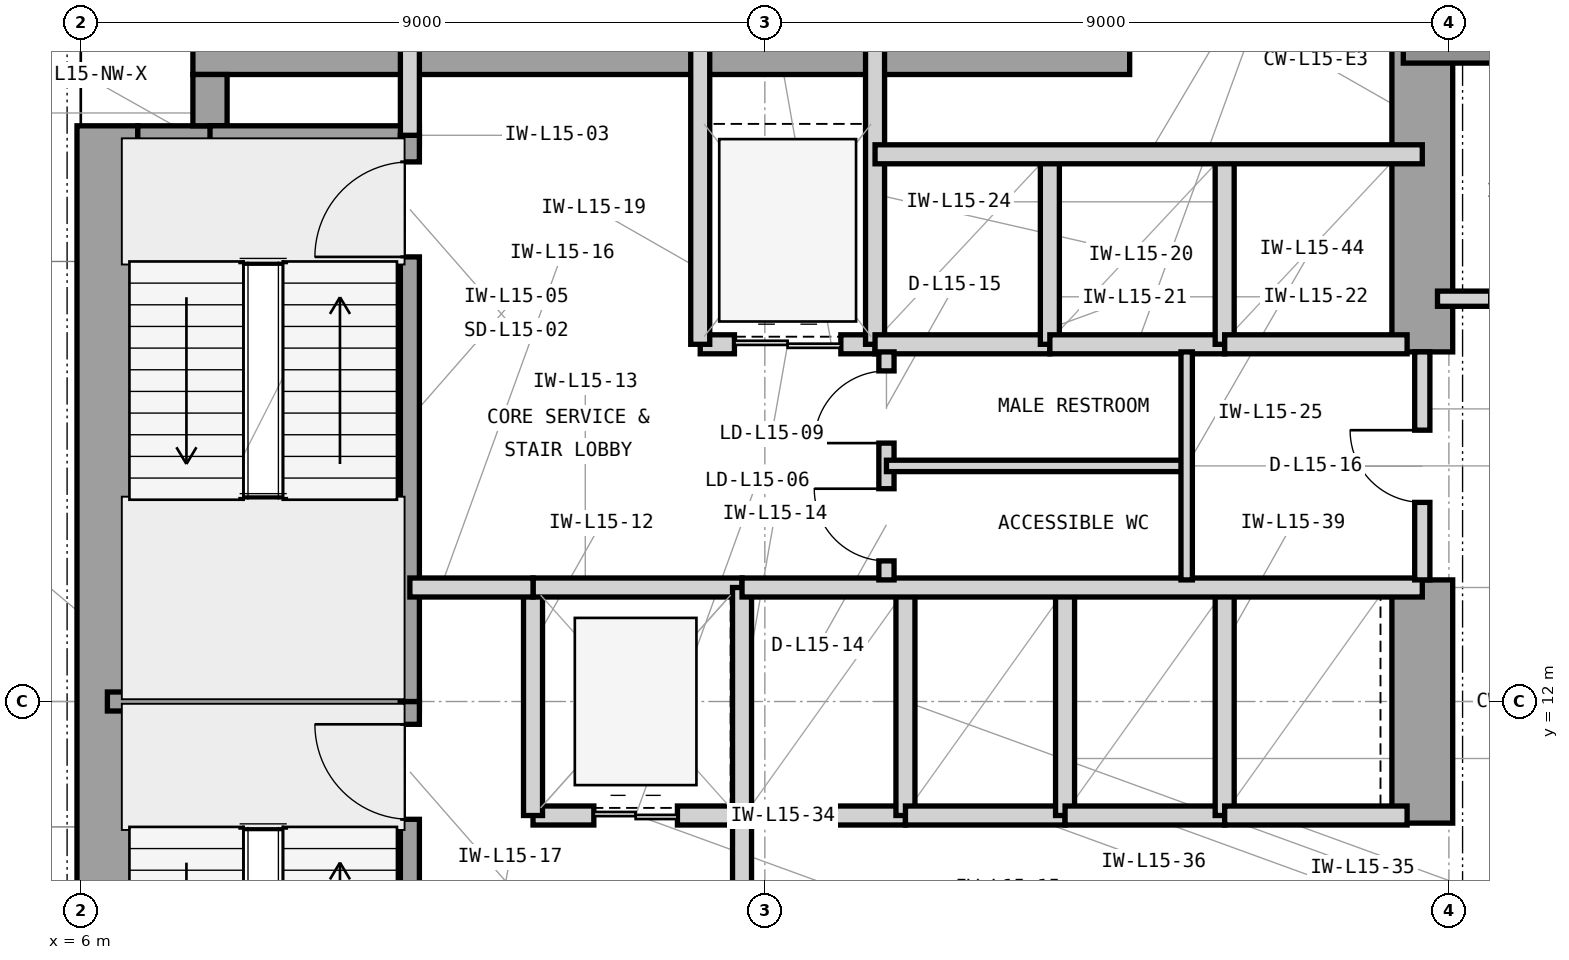
"""IFC4 building model, lengths in metres.
Left out: names, types, materials, properties, quantities, classifications, styles, units other than length and angle.
Written with IfcOpenShell. Run it as: python <this file> out.ifc"""

import sys

from ifc_helpers import new_model, si_unit, direction, frame, frame_2d, origin, origin_2d, place, context, subcontext, project, spatial, rectangle, extrude, element, fill, save


model = new_model("IFC4")
c1 = context("Model", 3, precision=1e-05, world=origin(), true_north=direction((0.0, 1.0)))
c2 = subcontext(c1, "Body", "Model", "MODEL_VIEW")
j1 = project(units=[si_unit("LENGTHUNIT", "METRE"), si_unit("PLANEANGLEUNIT", "RADIAN")], contexts=[c1])
p1 = place(None, origin())
s1 = spatial("IfcSite", under=j1, at=p1, CompositionType="ELEMENT")
p2 = place(p1, origin())
s2 = spatial("IfcBuilding", under=s1, at=p2, CompositionType="ELEMENT")
p3 = place(p2, frame((0.0, 0.0, 67.8)))
s3 = spatial("IfcBuildingStorey", under=s2, at=p3, CompositionType="ELEMENT", Elevation=67.8)
p4 = place(p3, frame((6.35, 4.425, 0.0), z_axis=(0.0, 0.0, 1.0), x_axis=(0.0, 1.0, 0.0)))
e1 = element("IfcWall", 1, at=p4, inside=s3, PredefinedType="SHEAR", context=c2, shape_type="SweptSolid", body=[
    extrude(rectangle(XDim=15.15, YDim=0.8, at=frame_2d((7.575, 0.0))), origin(), (0.0, 0.0, 1.0), 4.2),
])
p5 = place(p3, frame((7.475, 20.65, 0.0), z_axis=(0.0, 0.0, 1.0), x_axis=(1.0, 0.0, 0.0)))
e2 = element("IfcWall", 2, at=p5, inside=s3, PredefinedType="SHEAR", context=c2, shape_type="SweptSolid", body=[
    extrude(rectangle(XDim=12.325, YDim=0.8, at=frame_2d((6.163, 0.0))), origin(), (0.0, 0.0, 1.0), 4.2),
])
p6 = place(p3, frame((23.65, 10.4, 0.0), z_axis=(0.0, 0.0, 1.0), x_axis=(0.0, 1.0, 0.0)))
e3 = element("IfcWall", 3, at=p6, inside=s3, PredefinedType="SHEAR", context=c2, shape_type="SweptSolid", body=[
    extrude(rectangle(XDim=3.2, YDim=0.8, at=frame_2d((1.6, 0.0))), origin(), (0.0, 0.0, 1.0), 4.2),
])
p7 = place(p3, frame((23.65, 16.6, 0.0), z_axis=(0.0, 0.0, 1.0), x_axis=(0.0, 1.0, 0.0)))
e4 = element("IfcWall", 4, at=p7, inside=s3, PredefinedType="SHEAR", context=c2, shape_type="SweptSolid", body=[
    extrude(rectangle(XDim=4.05, YDim=0.8, at=frame_2d((2.025, 0.0))), origin(), (0.0, 0.0, 1.0), 4.2),
])
p8 = place(p3, frame((6.75, 19.35, 0.0), z_axis=(0.0, 0.0, 1.0), x_axis=(1.0, 0.0, 0.0)))
e5 = element("IfcWall", 5, at=p8, inside=s3, PredefinedType="SHEAR", context=c2, shape_type="SweptSolid", body=[
    extrude(rectangle(XDim=1.175, YDim=0.45, at=frame_2d((0.587, 0.0))), origin(), (0.0, 0.0, 1.0), 4.2),
])
p9 = place(p3, frame((7.7, 19.575, 0.0), z_axis=(0.0, 0.0, 1.0), x_axis=(0.0, 1.0, 0.0)))
e6 = element("IfcWall", 6, at=p9, inside=s3, PredefinedType="SHEAR", context=c2, shape_type="SweptSolid", body=[
    extrude(rectangle(XDim=0.675, YDim=0.45, at=frame_2d((0.337, 0.0))), origin(), (0.0, 0.0, 1.0), 4.2),
])
p10 = place(p3, frame((24.0, 21.0, 0.0), z_axis=(0.0, 0.0, 1.0), x_axis=(1.0, 0.0, 0.0)))
e7 = element("IfcColumn", 7, at=p10, inside=s3, PredefinedType="COLUMN", context=c2, shape_type="SweptSolid", body=[
    extrude(rectangle(XDim=1.2, YDim=1.2, at=origin_2d()), origin(), (0.0, 0.0, 1.0), 4.2),
])
p11 = place(p3, frame((6.35, 12.0, 0.0), z_axis=(0.0, 0.0, 1.0), x_axis=(1.0, 0.0, 0.0)))
e8 = element("IfcWall", 8, at=p11, inside=s3, PredefinedType="SHEAR", context=c2, shape_type="SweptSolid", body=[
    extrude(rectangle(XDim=4.105, YDim=0.25, at=frame_2d((2.052, 0.0))), origin(), (0.0, 0.0, 1.0), 4.2),
])
p12 = place(p3, frame((7.7, 19.45, 0.0), z_axis=(0.0, 0.0, 1.0), x_axis=(1.0, 0.0, 0.0)))
e9 = element("IfcWall", 9, at=p12, inside=s3, PredefinedType="SHEAR", context=c2, shape_type="SweptSolid", body=[
    extrude(rectangle(XDim=2.755, YDim=0.25, at=frame_2d((1.377, 0.0))), origin(), (0.0, 0.0, 1.0), 4.2),
])
p13 = place(p3, frame((10.33, 4.55, 0.0), z_axis=(0.0, 0.0, 1.0), x_axis=(0.0, 1.0, 0.0)))
e10 = element("IfcWall", 10, at=p13, inside=s3, PredefinedType="SHEAR", context=c2, shape_type="SweptSolid", body=[
    extrude(rectangle(XDim=7.45, YDim=0.25, at=frame_2d((3.725, 0.0))), origin(), (0.0, 0.0, 1.0), 4.2),
])
p14 = place(p13, frame((5.9, 0.0, 0.0)))
e11 = element("IfcOpeningElement", 11, at=p14, cuts=e10, PredefinedType="OPENING", context=c2, shape_type="SweptSolid", body=[
    extrude(rectangle(XDim=1.25, YDim=2.2, at=frame_2d((0.625, 1.1))), frame((0.0, 0.135, 0.0), z_axis=(0.0, -1.0, 0.0), x_axis=(1.0, 0.0, 0.0)), (0.0, 0.0, 1.0), 0.27),
])
p15 = place(p3, frame((10.33, 12.0, 0.0), z_axis=(0.0, 0.0, 1.0), x_axis=(0.0, 1.0, 0.0)))
e12 = element("IfcWall", 12, at=p15, inside=s3, PredefinedType="SHEAR", context=c2, shape_type="SweptSolid", body=[
    extrude(rectangle(XDim=7.45, YDim=0.25, at=frame_2d((3.725, 0.0))), origin(), (0.0, 0.0, 1.0), 4.2),
])
p16 = place(p15, frame((5.85, 0.0, 0.0)))
e13 = element("IfcOpeningElement", 13, at=p16, cuts=e12, PredefinedType="OPENING", context=c2, shape_type="SweptSolid", body=[
    extrude(rectangle(XDim=1.25, YDim=2.2, at=frame_2d((0.625, 1.1))), frame((0.0, 0.135, 0.0), z_axis=(0.0, -1.0, 0.0), x_axis=(1.0, 0.0, 0.0)), (0.0, 0.0, 1.0), 0.27),
])
p17 = place(p3, frame((10.33, 19.45, 0.0), z_axis=(0.0, 0.0, 1.0), x_axis=(0.0, 1.0, 0.0)))
e14 = element("IfcWall", 14, at=p17, inside=s3, PredefinedType="PARTITIONING", context=c2, shape_type="SweptSolid", body=[
    extrude(rectangle(XDim=1.2, YDim=0.25, at=frame_2d((0.6, 0.0))), origin(), (0.0, 0.0, 1.0), 3.114),
])
p18 = place(p3, frame((11.95, 10.5, 0.0), z_axis=(0.0, 0.0, 1.0), x_axis=(1.0, 0.0, 0.0)))
e15 = element("IfcWall", 15, at=p18, inside=s3, PredefinedType="PARTITIONING", context=c2, shape_type="SweptSolid", body=[
    extrude(rectangle(XDim=2.75, YDim=0.25, at=frame_2d((1.375, 0.0))), origin(), (0.0, 0.0, 1.0), 3.426),
])
p19 = place(p18, frame((0.8, 0.0, 0.0)))
e16 = element("IfcOpeningElement", 16, at=p19, cuts=e15, PredefinedType="OPENING", context=c2, shape_type="SweptSolid", body=[
    extrude(rectangle(XDim=1.1, YDim=2.25, at=frame_2d((0.55, 1.125))), frame((0.0, 0.135, 0.0), z_axis=(0.0, -1.0, 0.0), x_axis=(1.0, 0.0, 0.0)), (0.0, 0.0, 1.0), 0.27),
])
p20 = place(p3, frame((11.95, 10.5, 0.0), z_axis=(0.0, 0.0, 1.0), x_axis=(0.0, 1.0, 0.0)))
e17 = element("IfcWall", 17, at=p20, inside=s3, PredefinedType="PARTITIONING", context=c2, shape_type="SweptSolid", body=[
    extrude(rectangle(XDim=3.0, YDim=0.25, at=frame_2d((1.5, 0.0))), origin(), (0.0, 0.0, 1.0), 3.97),
])
p21 = place(p3, frame((11.95, 13.5, 0.0), z_axis=(0.0, 0.0, 1.0), x_axis=(1.0, 0.0, 0.0)))
e18 = element("IfcWall", 18, at=p21, inside=s3, PredefinedType="PARTITIONING", context=c2, shape_type="SweptSolid", body=[
    extrude(rectangle(XDim=2.75, YDim=0.25, at=frame_2d((1.375, 0.0))), origin(), (0.0, 0.0, 1.0), 3.426),
])
p22 = place(p3, frame((14.7, 10.5, 0.0), z_axis=(0.0, 0.0, 1.0), x_axis=(0.0, 1.0, 0.0)))
e19 = element("IfcWall", 19, at=p22, inside=s3, PredefinedType="PARTITIONING", context=c2, shape_type="SweptSolid", body=[
    extrude(rectangle(XDim=3.0, YDim=0.25, at=frame_2d((1.5, 0.0))), origin(), (0.0, 0.0, 1.0), 3.97),
])
p23 = place(p3, frame((14.7, 6.7, 0.0), z_axis=(0.0, 0.0, 1.0), x_axis=(0.0, 1.0, 0.0)))
e20 = element("IfcWall", 20, at=p23, inside=s3, PredefinedType="PARTITIONING", context=c2, shape_type="SweptSolid", body=[
    extrude(rectangle(XDim=3.8, YDim=0.25, at=frame_2d((1.9, 0.0))), origin(), (0.0, 0.0, 1.0), 3.97),
])
p24 = place(p23, frame((1.3, 0.0, 0.0)))
e21 = element("IfcOpeningElement", 21, at=p24, cuts=e20, PredefinedType="OPENING", context=c2, shape_type="SweptSolid", body=[
    extrude(rectangle(XDim=1.2, YDim=2.2, at=frame_2d((0.6, 1.1))), frame((0.0, 0.135, 0.0), z_axis=(0.0, -1.0, 0.0), x_axis=(1.0, 0.0, 0.0)), (0.0, 0.0, 1.0), 0.27),
])
p25 = place(p3, frame((10.33, 13.5, 0.0), z_axis=(0.0, 0.0, 1.0), x_axis=(1.0, 0.0, 0.0)))
e22 = element("IfcWall", 22, at=p25, inside=s3, PredefinedType="PARTITIONING", context=c2, shape_type="SweptSolid", body=[
    extrude(rectangle(XDim=1.62, YDim=0.25, at=frame_2d((0.81, 0.0))), origin(), (0.0, 0.0, 1.0), 3.426),
])
p26 = place(p3, frame((14.15, 16.7, 0.0), z_axis=(0.0, 0.0, 1.0), x_axis=(1.0, 0.0, 0.0)))
e23 = element("IfcWall", 23, at=p26, inside=s3, PredefinedType="PARTITIONING", context=c2, shape_type="SweptSolid", body=[
    extrude(rectangle(XDim=2.3, YDim=0.25, at=frame_2d((1.15, 0.0))), origin(), (0.0, 0.0, 1.0), 3.426),
])
p27 = place(p26, frame((0.45, 0.0, 0.0)))
e24 = element("IfcOpeningElement", 24, at=p27, cuts=e23, PredefinedType="OPENING", context=c2, shape_type="SweptSolid", body=[
    extrude(rectangle(XDim=1.4, YDim=2.35, at=frame_2d((0.7, 1.175))), frame((0.0, 0.135, 0.0), z_axis=(0.0, -1.0, 0.0), x_axis=(1.0, 0.0, 0.0)), (0.0, 0.0, 1.0), 0.27),
])
for number, where, z_axis, x_axis in (
    (25, (14.15, 16.7, 0.0), (0.0, 0.0, 1.0), (0.0, 1.0, 0.0)),
    (26, (16.45, 16.7, 0.0), (0.0, 0.0, 1.0), (0.0, 1.0, 0.0)),
):
    element("IfcWall", number, at=place(p3, frame(where, z_axis=z_axis, x_axis=x_axis)), inside=s3, PredefinedType="PARTITIONING", context=c2, shape_type="SweptSolid", body=[
        extrude(rectangle(XDim=3.95, YDim=0.25, at=frame_2d((1.975, 0.0))), origin(), (0.0, 0.0, 1.0), 3.97),
    ])
p28 = place(p3, frame((16.45, 16.7, 0.0), z_axis=(0.0, 0.0, 1.0), x_axis=(1.0, 0.0, 0.0)))
e27 = element("IfcWall", 27, at=p28, inside=s3, PredefinedType="PARTITIONING", context=c2, shape_type="SweptSolid", body=[
    extrude(rectangle(XDim=2.3, YDim=0.25, at=frame_2d((1.15, 0.0))), origin(), (0.0, 0.0, 1.0), 3.426),
])
p29 = place(p3, frame((18.75, 16.7, 0.0), z_axis=(0.0, 0.0, 1.0), x_axis=(0.0, 1.0, 0.0)))
e28 = element("IfcWall", 28, at=p29, inside=s3, PredefinedType="PARTITIONING", context=c2, shape_type="SweptSolid", body=[
    extrude(rectangle(XDim=2.5, YDim=0.25, at=frame_2d((1.25, 0.0))), origin(), (0.0, 0.0, 1.0), 3.97),
])
p30 = place(p3, frame((18.75, 16.7, 0.0), z_axis=(0.0, 0.0, 1.0), x_axis=(1.0, 0.0, 0.0)))
e29 = element("IfcWall", 29, at=p30, inside=s3, PredefinedType="PARTITIONING", context=c2, shape_type="SweptSolid", body=[
    extrude(rectangle(XDim=2.3, YDim=0.25, at=frame_2d((1.15, 0.0))), origin(), (0.0, 0.0, 1.0), 3.426),
])
p31 = place(p3, frame((21.05, 16.7, 0.0), z_axis=(0.0, 0.0, 1.0), x_axis=(0.0, 1.0, 0.0)))
e30 = element("IfcWall", 30, at=p31, inside=s3, PredefinedType="PARTITIONING", context=c2, shape_type="SweptSolid", body=[
    extrude(rectangle(XDim=2.5, YDim=0.25, at=frame_2d((1.25, 0.0))), origin(), (0.0, 0.0, 1.0), 3.97),
])
p32 = place(p3, frame((21.05, 16.7, 0.0), z_axis=(0.0, 0.0, 1.0), x_axis=(1.0, 0.0, 0.0)))
e31 = element("IfcWall", 31, at=p32, inside=s3, PredefinedType="PARTITIONING", context=c2, shape_type="SweptSolid", body=[
    extrude(rectangle(XDim=2.4, YDim=0.25, at=frame_2d((1.2, 0.0))), origin(), (0.0, 0.0, 1.0), 3.426),
])
p33 = place(p3, frame((16.45, 19.2, 0.0), z_axis=(0.0, 0.0, 1.0), x_axis=(1.0, 0.0, 0.0)))
e32 = element("IfcWall", 32, at=p33, inside=s3, PredefinedType="PARTITIONING", context=c2, shape_type="SweptSolid", body=[
    extrude(rectangle(XDim=7.2, YDim=0.25, at=frame_2d((3.6, 0.0))), origin(), (0.0, 0.0, 1.0), 3.97),
])
p34 = place(p3, frame((14.7, 10.5, 0.0), z_axis=(0.0, 0.0, 1.0), x_axis=(1.0, 0.0, 0.0)))
e33 = element("IfcWall", 33, at=p34, inside=s3, PredefinedType="PARTITIONING", context=c2, shape_type="SweptSolid", body=[
    extrude(rectangle(XDim=2.15, YDim=0.25, at=frame_2d((1.075, 0.0))), origin(), (0.0, 0.0, 1.0), 3.426),
])
p35 = place(p3, frame((16.85, 10.5, 0.0), z_axis=(0.0, 0.0, 1.0), x_axis=(0.0, 1.0, 0.0)))
e34 = element("IfcWall", 34, at=p35, inside=s3, PredefinedType="PARTITIONING", context=c2, shape_type="SweptSolid", body=[
    extrude(rectangle(XDim=3.0, YDim=0.25, at=frame_2d((1.5, 0.0))), origin(), (0.0, 0.0, 1.0), 3.97),
])
p36 = place(p3, frame((16.85, 10.5, 0.0), z_axis=(0.0, 0.0, 1.0), x_axis=(1.0, 0.0, 0.0)))
e35 = element("IfcWall", 35, at=p36, inside=s3, PredefinedType="PARTITIONING", context=c2, shape_type="SweptSolid", body=[
    extrude(rectangle(XDim=2.1, YDim=0.25, at=frame_2d((1.05, 0.0))), origin(), (0.0, 0.0, 1.0), 3.426),
])
p37 = place(p3, frame((18.95, 10.5, 0.0), z_axis=(0.0, 0.0, 1.0), x_axis=(0.0, 1.0, 0.0)))
e36 = element("IfcWall", 36, at=p37, inside=s3, PredefinedType="PARTITIONING", context=c2, shape_type="SweptSolid", body=[
    extrude(rectangle(XDim=3.0, YDim=0.25, at=frame_2d((1.5, 0.0))), origin(), (0.0, 0.0, 1.0), 3.97),
])
p38 = place(p3, frame((18.95, 10.5, 0.0), z_axis=(0.0, 0.0, 1.0), x_axis=(1.0, 0.0, 0.0)))
e37 = element("IfcWall", 37, at=p38, inside=s3, PredefinedType="PARTITIONING", context=c2, shape_type="SweptSolid", body=[
    extrude(rectangle(XDim=2.1, YDim=0.25, at=frame_2d((1.05, 0.0))), origin(), (0.0, 0.0, 1.0), 3.426),
])
p39 = place(p3, frame((21.05, 10.5, 0.0), z_axis=(0.0, 0.0, 1.0), x_axis=(0.0, 1.0, 0.0)))
e38 = element("IfcWall", 38, at=p39, inside=s3, PredefinedType="PARTITIONING", context=c2, shape_type="SweptSolid", body=[
    extrude(rectangle(XDim=3.0, YDim=0.25, at=frame_2d((1.5, 0.0))), origin(), (0.0, 0.0, 1.0), 3.97),
])
p40 = place(p3, frame((21.05, 10.5, 0.0), z_axis=(0.0, 0.0, 1.0), x_axis=(1.0, 0.0, 0.0)))
e39 = element("IfcWall", 39, at=p40, inside=s3, PredefinedType="PARTITIONING", context=c2, shape_type="SweptSolid", body=[
    extrude(rectangle(XDim=2.4, YDim=0.25, at=frame_2d((1.2, 0.0))), origin(), (0.0, 0.0, 1.0), 3.426),
])
p41 = place(p3, frame((14.7, 13.5, 0.0), z_axis=(0.0, 0.0, 1.0), x_axis=(1.0, 0.0, 0.0)))
e40 = element("IfcWall", 40, at=p41, inside=s3, PredefinedType="PARTITIONING", context=c2, shape_type="SweptSolid", body=[
    extrude(rectangle(XDim=8.95, YDim=0.25, at=frame_2d((4.475, 0.0))), origin(), (0.0, 0.0, 1.0), 3.426),
])
p42 = place(p3, frame((16.6, 13.6, 0.0), z_axis=(0.0, 0.0, 1.0), x_axis=(0.0, 1.0, 0.0)))
e41 = element("IfcWall", 41, at=p42, inside=s3, PredefinedType="PARTITIONING", context=c2, shape_type="SweptSolid", body=[
    extrude(rectangle(XDim=3.0, YDim=0.2, at=frame_2d((1.5, 0.0))), origin(), (0.0, 0.0, 1.0), 3.97),
])
p43 = place(p42, frame((0.25, 0.0, 0.0)))
e42 = element("IfcOpeningElement", 42, at=p43, cuts=e41, PredefinedType="OPENING", context=c2, shape_type="SweptSolid", body=[
    extrude(rectangle(XDim=0.95, YDim=2.1, at=frame_2d((0.475, 1.05))), frame((0.0, 0.11, 0.0), z_axis=(0.0, -1.0, 0.0), x_axis=(1.0, 0.0, 0.0)), (0.0, 0.0, 1.0), 0.22),
])
p44 = place(p42, frame((1.8, 0.0, 0.0)))
e43 = element("IfcOpeningElement", 43, at=p44, cuts=e41, PredefinedType="OPENING", context=c2, shape_type="SweptSolid", body=[
    extrude(rectangle(XDim=0.95, YDim=2.1, at=frame_2d((0.475, 1.05))), frame((0.0, 0.11, 0.0), z_axis=(0.0, -1.0, 0.0), x_axis=(1.0, 0.0, 0.0)), (0.0, 0.0, 1.0), 0.22),
])
p45 = place(p3, frame((16.6, 15.1, 0.0), z_axis=(0.0, 0.0, 1.0), x_axis=(1.0, 0.0, 0.0)))
e44 = element("IfcWall", 44, at=p45, inside=s3, PredefinedType="PARTITIONING", context=c2, shape_type="SweptSolid", body=[
    extrude(rectangle(XDim=3.95, YDim=0.15, at=frame_2d((1.975, 0.0))), origin(), (0.0, 0.0, 1.0), 3.97),
])
p46 = place(p3, frame((20.55, 13.6, 0.0), z_axis=(0.0, 0.0, 1.0), x_axis=(0.0, 1.0, 0.0)))
e45 = element("IfcWall", 45, at=p46, inside=s3, PredefinedType="PARTITIONING", context=c2, shape_type="SweptSolid", body=[
    extrude(rectangle(XDim=3.0, YDim=0.15, at=frame_2d((1.5, 0.0))), origin(), (0.0, 0.0, 1.0), 3.97),
])
p47 = place(p3, frame((23.65, 13.6, 0.0), z_axis=(0.0, 0.0, 1.0), x_axis=(0.0, 1.0, 0.0)))
e46 = element("IfcWall", 46, at=p47, inside=s3, PredefinedType="PARTITIONING", context=c2, shape_type="SweptSolid", body=[
    extrude(rectangle(XDim=3.0, YDim=0.2, at=frame_2d((1.5, 0.0))), origin(), (0.0, 0.0, 1.0), 3.97),
])
p48 = place(p47, frame((1.02, 0.0, 0.0)))
e47 = element("IfcOpeningElement", 47, at=p48, cuts=e46, PredefinedType="OPENING", context=c2, shape_type="SweptSolid", body=[
    extrude(rectangle(XDim=0.95, YDim=2.1, at=frame_2d((0.475, 1.05))), frame((0.0, 0.11, 0.0), z_axis=(0.0, -1.0, 0.0), x_axis=(1.0, 0.0, 0.0)), (0.0, 0.0, 1.0), 0.22),
])
p49 = place(p3, frame((23.85, 17.3, 0.0), z_axis=(0.0, 0.0, 1.0), x_axis=(1.0, 0.0, 0.0)))
e48 = element("IfcWall", 48, at=p49, inside=s3, PredefinedType="PARTITIONING", context=c2, shape_type="SweptSolid", body=[
    extrude(rectangle(XDim=2.85, YDim=0.2, at=frame_2d((1.425, 0.0))), origin(), (0.0, 0.0, 1.0), 3.97),
])
p50 = place(p49, frame((0.7, 0.0, 0.0)))
e49 = element("IfcOpeningElement", 49, at=p50, cuts=e48, PredefinedType="OPENING", context=c2, shape_type="SweptSolid", body=[
    extrude(rectangle(XDim=1.0, YDim=2.15, at=frame_2d((0.5, 1.075))), frame((0.0, 0.11, 0.0), z_axis=(0.0, -1.0, 0.0), x_axis=(1.0, 0.0, 0.0)), (0.0, 0.0, 1.0), 0.22),
])
p51 = place(p14, origin())
e50 = element("IfcDoor", 50, at=p51, inside=s3, OperationType="SINGLE_SWING_RIGHT", PredefinedType="DOOR", context=c2, shape_type="SweptSolid", body=[
    extrude(rectangle(XDim=1.25, YDim=2.2, at=frame_2d((0.625, 1.1))), frame((0.0, 0.025, 0.0), z_axis=(0.0, -1.0, 0.0), x_axis=(1.0, 0.0, 0.0)), (0.0, 0.0, 1.0), 0.05),
])
fill(e11, e50)
p52 = place(p16, origin())
e51 = element("IfcDoor", 51, at=p52, inside=s3, OperationType="SINGLE_SWING_LEFT", PredefinedType="DOOR", context=c2, shape_type="SweptSolid", body=[
    extrude(rectangle(XDim=1.25, YDim=2.2, at=frame_2d((0.625, 1.1))), frame((0.0, 0.025, 0.0), z_axis=(0.0, -1.0, 0.0), x_axis=(1.0, 0.0, 0.0)), (0.0, 0.0, 1.0), 0.05),
])
fill(e13, e51)
p53 = place(p19, origin())
e52 = element("IfcDoor", 52, at=p53, inside=s3, OperationType="DOUBLE_DOOR_SLIDING", PredefinedType="DOOR", context=c2, shape_type="SweptSolid", body=[
    extrude(rectangle(XDim=1.1, YDim=2.25, at=frame_2d((0.55, 1.125))), frame((0.0, 0.025, 0.0), z_axis=(0.0, -1.0, 0.0), x_axis=(1.0, 0.0, 0.0)), (0.0, 0.0, 1.0), 0.05),
])
fill(e16, e52)
p54 = place(p27, origin())
e53 = element("IfcDoor", 53, at=p54, inside=s3, OperationType="DOUBLE_DOOR_SLIDING", PredefinedType="DOOR", context=c2, shape_type="SweptSolid", body=[
    extrude(rectangle(XDim=1.4, YDim=2.35, at=frame_2d((0.7, 1.175))), frame((0.0, 0.025, 0.0), z_axis=(0.0, -1.0, 0.0), x_axis=(1.0, 0.0, 0.0)), (0.0, 0.0, 1.0), 0.05),
])
fill(e24, e53)
p55 = place(p43, origin())
e54 = element("IfcDoor", 54, at=p55, inside=s3, OperationType="SINGLE_SWING_RIGHT", PredefinedType="DOOR", context=c2, shape_type="SweptSolid", body=[
    extrude(rectangle(XDim=0.95, YDim=2.1, at=frame_2d((0.475, 1.05))), frame((0.0, 0.025, 0.0), z_axis=(0.0, -1.0, 0.0), x_axis=(1.0, 0.0, 0.0)), (0.0, 0.0, 1.0), 0.05),
])
fill(e42, e54)
p56 = place(p44, origin())
e55 = element("IfcDoor", 55, at=p56, inside=s3, OperationType="SINGLE_SWING_LEFT", PredefinedType="DOOR", context=c2, shape_type="SweptSolid", body=[
    extrude(rectangle(XDim=0.95, YDim=2.1, at=frame_2d((0.475, 1.05))), frame((0.0, 0.025, 0.0), z_axis=(0.0, -1.0, 0.0), x_axis=(1.0, 0.0, 0.0)), (0.0, 0.0, 1.0), 0.05),
])
fill(e43, e55)
p57 = place(p48, origin())
e56 = element("IfcDoor", 56, at=p57, inside=s3, OperationType="SINGLE_SWING_RIGHT", PredefinedType="DOOR", context=c2, shape_type="SweptSolid", body=[
    extrude(rectangle(XDim=0.95, YDim=2.1, at=frame_2d((0.475, 1.05))), frame((0.0, 0.025, 0.0), z_axis=(0.0, -1.0, 0.0), x_axis=(1.0, 0.0, 0.0)), (0.0, 0.0, 1.0), 0.05),
])
fill(e47, e56)
save(model, sys.argv[1])
